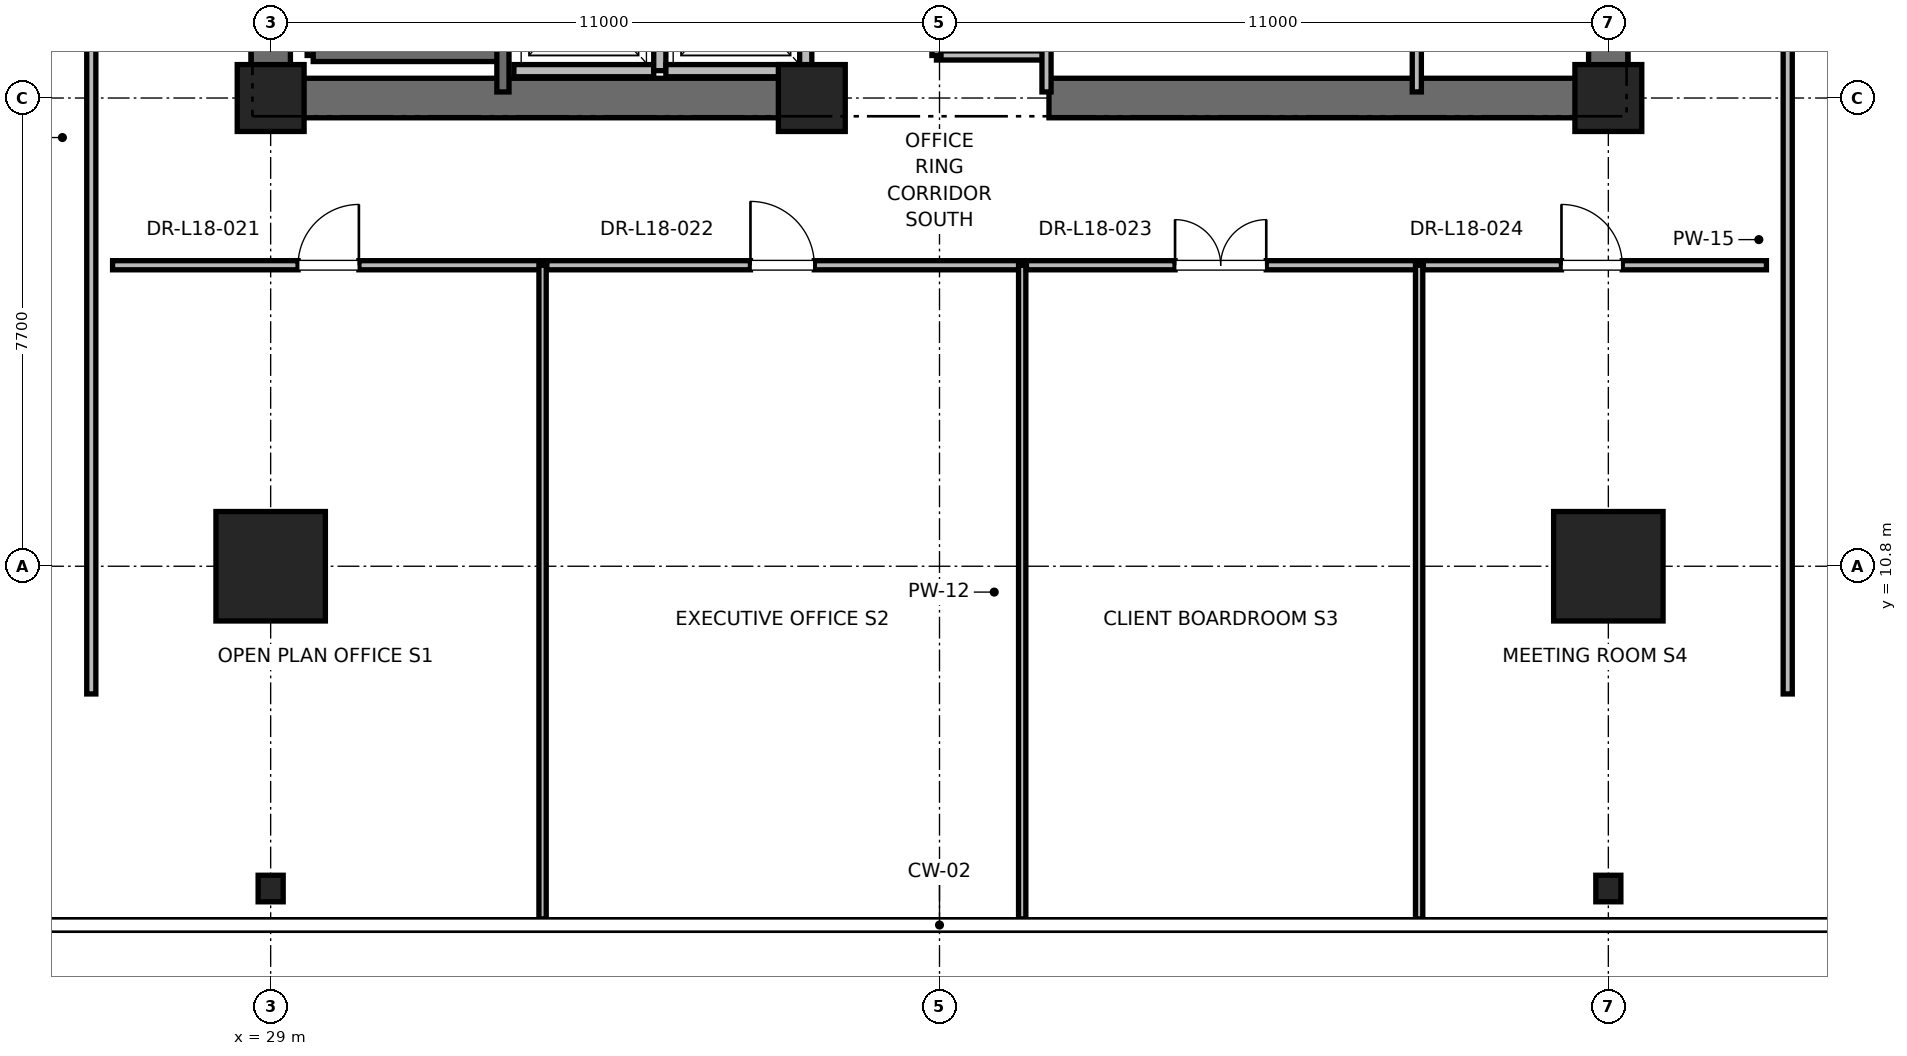
"""IFC4 building model, lengths in metres.
Left out: names, types, materials, properties, quantities, classifications, styles, units other than length and angle.
Written with IfcOpenShell. Run it as: python <this file> out.ifc"""

import sys

from ifc_helpers import new_model, si_unit, direction, frame, frame_2d, origin, origin_2d, place, context, subcontext, project, spatial, rectangle, i_section, extrude, element, fill, save


model = new_model("IFC4")
c1 = context("Model", 3, precision=1e-05, world=origin(), true_north=direction((0.0, 1.0)))
c2 = subcontext(c1, "Body", "Model", "MODEL_VIEW")
j1 = project(units=[si_unit("LENGTHUNIT", "METRE"), si_unit("PLANEANGLEUNIT", "RADIAN")], contexts=[c1])
p1 = place(None, origin())
s1 = spatial("IfcSite", under=j1, at=p1, CompositionType="ELEMENT")
p2 = place(p1, origin())
s2 = spatial("IfcBuilding", under=s1, at=p2, CompositionType="ELEMENT")
p3 = place(p2, frame((0.0, 0.0, 79.6)))
s3 = spatial("IfcBuildingStorey", under=s2, at=p3, CompositionType="ELEMENT", Elevation=79.6)
for number, where, z_axis, x_axis in (
    (1, (29.0, 10.8, 0.0), (0.0, 0.0, 1.0), (1.0, 0.0, 0.0)),
    (2, (51.0, 10.8, 0.0), (0.0, 0.0, 1.0), (1.0, 0.0, 0.0)),
):
    element("IfcColumn", number, at=place(p3, frame(where, z_axis=z_axis, x_axis=x_axis)), inside=s3, PredefinedType="COLUMN", context=c2, shape_type="SweptSolid", body=[
        extrude(rectangle(XDim=1.8, YDim=1.8, at=origin_2d()), origin(), (0.0, 0.0, 1.0), 4.0),
    ])
for number, where, z_axis, x_axis in (
    (3, (29.0, 5.5, 0.0), (0.0, 0.0, 1.0), (1.0, 0.0, 0.0)),
    (4, (51.0, 5.5, 0.0), (0.0, 0.0, 1.0), (1.0, 0.0, 0.0)),
):
    element("IfcColumn", number, at=place(p3, frame(where, z_axis=z_axis, x_axis=x_axis)), inside=s3, PredefinedType="COLUMN", context=c2, shape_type="SweptSolid", body=[
        extrude(i_section(OverallWidth=0.412, OverallDepth=0.437, WebThickness=0.036, FlangeThickness=0.058, FilletRadius=0.015, at=origin_2d()), origin(), (0.0, 0.0, 1.0), 4.0),
    ])
for number, where, z_axis, x_axis in (
    (5, (29.0, 18.5, 0.0), (0.0, 0.0, 1.0), (1.0, 0.0, 0.0)),
    (6, (51.0, 18.5, 0.0), (0.0, 0.0, 1.0), (1.0, 0.0, 0.0)),
    (7, (37.9, 18.5, 0.0), (0.0, 0.0, 1.0), (1.0, 0.0, 0.0)),
):
    element("IfcColumn", number, at=place(p3, frame(where, z_axis=z_axis, x_axis=x_axis)), inside=s3, PredefinedType="PILASTER", context=c2, shape_type="SweptSolid", body=[
        extrude(rectangle(XDim=1.1, YDim=1.1, at=origin_2d()), origin(), (0.0, 0.0, 1.0), 4.0),
    ])
for number, where, z_axis, x_axis in (
    (8, (29.0, 18.5, 0.0), (0.0, 0.0, 1.0), (1.0, 0.0, 0.0)),
    (9, (41.8, 18.5, 0.0), (0.0, 0.0, 1.0), (1.0, 0.0, 0.0)),
):
    element("IfcWall", number, at=place(p3, frame(where, z_axis=z_axis, x_axis=x_axis)), inside=s3, PredefinedType="SHEAR", context=c2, shape_type="SweptSolid", body=[
        extrude(rectangle(XDim=9.2, YDim=0.65, at=frame_2d((4.6, 0.0))), origin(), (0.0, 0.0, 1.0), 3.76),
    ])
p4 = place(p3, frame((29.0, 18.5, 0.0), z_axis=(0.0, 0.0, 1.0), x_axis=(0.0, 1.0, 0.0)))
e10 = element("IfcWall", 10, at=p4, inside=s3, PredefinedType="SHEAR", context=c2, shape_type="SweptSolid", body=[
    extrude(rectangle(XDim=8.8, YDim=0.65, at=frame_2d((4.4, 0.0))), origin(), (0.0, 0.0, 1.0), 3.76),
])
p5 = place(p3, frame((51.0, 18.5, 0.0), z_axis=(0.0, 0.0, 1.0), x_axis=(0.0, 1.0, 0.0)))
e11 = element("IfcWall", 11, at=p5, inside=s3, PredefinedType="SHEAR", context=c2, shape_type="SweptSolid", body=[
    extrude(rectangle(XDim=5.8, YDim=0.65, at=frame_2d((2.9, 0.0))), origin(), (0.0, 0.0, 1.0), 3.76),
])
p6 = place(p3, frame((29.7, 19.2, 0.0), z_axis=(0.0, 0.0, 1.0), x_axis=(0.0, 1.0, 0.0)))
e12 = element("IfcWall", 12, at=p6, inside=s3, PredefinedType="SOLIDWALL", context=c2, shape_type="SweptSolid", body=[
    extrude(rectangle(XDim=8.15, YDim=0.2, at=frame_2d((4.075, 0.0))), origin(), (0.0, 0.0, 1.0), 3.76),
])
p7 = place(p3, frame((29.7, 19.2, 0.0), z_axis=(0.0, 0.0, 1.0), x_axis=(1.0, 0.0, 0.0)))
e13 = element("IfcWall", 13, at=p7, inside=s3, PredefinedType="SOLIDWALL", context=c2, shape_type="SweptSolid", body=[
    extrude(rectangle(XDim=3.12, YDim=0.2, at=frame_2d((1.56, 0.0))), origin(), (0.0, 0.0, 1.0), 3.76),
])
p8 = place(p3, frame((32.82, 18.6, 0.0), z_axis=(0.0, 0.0, 1.0), x_axis=(0.0, 1.0, 0.0)))
e14 = element("IfcWall", 14, at=p8, inside=s3, PredefinedType="SOLIDWALL", context=c2, shape_type="SweptSolid", body=[
    extrude(rectangle(XDim=8.78, YDim=0.2, at=frame_2d((4.39, 0.0))), origin(), (0.0, 0.0, 1.0), 3.76),
])
p9 = place(p3, frame((33.0, 18.95, 0.0), z_axis=(0.0, 0.0, 1.0), x_axis=(1.0, 0.0, 0.0)))
e15 = element("IfcWall", 15, at=p9, inside=s3, PredefinedType="SOLIDWALL", context=c2, shape_type="SweptSolid", body=[
    extrude(rectangle(XDim=2.3, YDim=0.2, at=frame_2d((1.15, 0.0))), origin(), (0.0, 0.0, 1.0), 3.76),
])
p10 = place(p3, frame((35.4, 18.95, 0.0), z_axis=(0.0, 0.0, 1.0), x_axis=(0.0, 1.0, 0.0)))
e16 = element("IfcWall", 16, at=p10, inside=s3, PredefinedType="SOLIDWALL", context=c2, shape_type="SweptSolid", body=[
    extrude(rectangle(XDim=2.6, YDim=0.2, at=frame_2d((1.3, 0.0))), origin(), (0.0, 0.0, 1.0), 3.76),
])
p11 = place(p3, frame((35.5, 18.95, 0.0), z_axis=(0.0, 0.0, 1.0), x_axis=(1.0, 0.0, 0.0)))
e17 = element("IfcWall", 17, at=p11, inside=s3, PredefinedType="SOLIDWALL", context=c2, shape_type="SweptSolid", body=[
    extrude(rectangle(XDim=2.3, YDim=0.2, at=frame_2d((1.15, 0.0))), origin(), (0.0, 0.0, 1.0), 2.54),
])
p12 = place(p3, frame((37.8, 18.95, 0.0), z_axis=(0.0, 0.0, 1.0), x_axis=(0.0, 1.0, 0.0)))
e18 = element("IfcWall", 18, at=p12, inside=s3, PredefinedType="SOLIDWALL", context=c2, shape_type="SweptSolid", body=[
    extrude(rectangle(XDim=2.6, YDim=0.2, at=frame_2d((1.3, 0.0))), origin(), (0.0, 0.0, 1.0), 2.54),
])
p13 = place(p3, frame((39.95, 19.2, 0.0), z_axis=(0.0, 0.0, 1.0), x_axis=(1.0, 0.0, 0.0)))
e19 = element("IfcWall", 19, at=p13, inside=s3, PredefinedType="PARTITIONING", context=c2, shape_type="SweptSolid", body=[
    extrude(rectangle(XDim=1.81, YDim=0.15, at=frame_2d((0.905, 0.0))), origin(), (0.0, 0.0, 1.0), 2.85),
])
p14 = place(p3, frame((41.76, 18.6, 0.0), z_axis=(0.0, 0.0, 1.0), x_axis=(0.0, 1.0, 0.0)))
e20 = element("IfcWall", 20, at=p14, inside=s3, PredefinedType="PARTITIONING", context=c2, shape_type="SweptSolid", body=[
    extrude(rectangle(XDim=3.6, YDim=0.15, at=frame_2d((1.8, 0.0))), origin(), (0.0, 0.0, 1.0), 2.54),
])
p15 = place(p3, frame((39.95, 19.2, 0.0), z_axis=(0.0, 0.0, 1.0), x_axis=(0.0, 1.0, 0.0)))
e21 = element("IfcWall", 21, at=p15, inside=s3, PredefinedType="PARTITIONING", context=c2, shape_type="SweptSolid", body=[
    extrude(rectangle(XDim=3.0, YDim=0.15, at=frame_2d((1.5, 0.0))), origin(), (0.0, 0.0, 1.0), 2.85),
])
p16 = place(p15, frame((1.05, 0.0, 0.0)))
e22 = element("IfcOpeningElement", 22, at=p16, cuts=e21, PredefinedType="OPENING", context=c2, shape_type="SweptSolid", body=[
    extrude(rectangle(XDim=0.9, YDim=2.1, at=frame_2d((0.45, 1.05))), frame((0.0, 0.075, 0.0), z_axis=(0.0, -1.0, 0.0), x_axis=(1.0, 0.0, 0.0)), (0.0, 0.0, 1.0), 0.15),
])
p17 = place(p3, frame((47.85, 18.6, 0.0), z_axis=(0.0, 0.0, 1.0), x_axis=(0.0, 1.0, 0.0)))
e23 = element("IfcWall", 23, at=p17, inside=s3, PredefinedType="PARTITIONING", context=c2, shape_type="SweptSolid", body=[
    extrude(rectangle(XDim=2.54, YDim=0.15, at=frame_2d((1.27, 0.0))), origin(), (0.0, 0.0, 1.0), 2.85),
])
p18 = place(p3, frame((26.4, 15.75, 0.0), z_axis=(0.0, 0.0, 1.0), x_axis=(1.0, 0.0, 0.0)))
e24 = element("IfcWall", 24, at=p18, inside=s3, PredefinedType="PARTITIONING", context=c2, shape_type="SweptSolid", body=[
    extrude(rectangle(XDim=7.072, YDim=0.15, at=frame_2d((3.536, 0.0))), origin(), (0.0, 0.0, 1.0), 2.85),
])
p19 = place(p18, frame((3.051, 0.0, 0.0)))
e25 = element("IfcOpeningElement", 25, at=p19, cuts=e24, PredefinedType="OPENING", context=c2, shape_type="SweptSolid", body=[
    extrude(rectangle(XDim=1.0, YDim=2.15, at=frame_2d((0.5, 1.075))), frame((0.0, 0.075, 0.0), z_axis=(0.0, -1.0, 0.0), x_axis=(1.0, 0.0, 0.0)), (0.0, 0.0, 1.0), 0.15),
])
p20 = place(p3, frame((33.472, 5.0, 0.0), z_axis=(0.0, 0.0, 1.0), x_axis=(0.0, 1.0, 0.0)))
e26 = element("IfcWall", 26, at=p20, inside=s3, PredefinedType="PARTITIONING", context=c2, shape_type="SweptSolid", body=[
    extrude(rectangle(XDim=10.75, YDim=0.12, at=frame_2d((5.375, 0.0))), origin(), (0.0, 0.0, 1.0), 2.39),
])
p21 = place(p3, frame((33.542, 15.75, 0.0), z_axis=(0.0, 0.0, 1.0), x_axis=(1.0, 0.0, 0.0)))
e27 = element("IfcWall", 27, at=p21, inside=s3, PredefinedType="PARTITIONING", context=c2, shape_type="SweptSolid", body=[
    extrude(rectangle(XDim=7.818, YDim=0.15, at=frame_2d((3.909, 0.0))), origin(), (0.0, 0.0, 1.0), 2.85),
])
p22 = place(p21, frame((3.349, 0.0, 0.0)))
e28 = element("IfcOpeningElement", 28, at=p22, cuts=e27, PredefinedType="OPENING", context=c2, shape_type="SweptSolid", body=[
    extrude(rectangle(XDim=1.05, YDim=2.2, at=frame_2d((0.525, 1.1))), frame((0.0, 0.075, 0.0), z_axis=(0.0, -1.0, 0.0), x_axis=(1.0, 0.0, 0.0)), (0.0, 0.0, 1.0), 0.15),
])
p23 = place(p3, frame((41.36, 5.0, 0.0), z_axis=(0.0, 0.0, 1.0), x_axis=(0.0, 1.0, 0.0)))
e29 = element("IfcWall", 29, at=p23, inside=s3, PredefinedType="PARTITIONING", context=c2, shape_type="SweptSolid", body=[
    extrude(rectangle(XDim=10.75, YDim=0.12, at=frame_2d((5.375, 0.0))), origin(), (0.0, 0.0, 1.0), 2.39),
])
p24 = place(p3, frame((41.43, 15.75, 0.0), z_axis=(0.0, 0.0, 1.0), x_axis=(1.0, 0.0, 0.0)))
e30 = element("IfcWall", 30, at=p24, inside=s3, PredefinedType="PARTITIONING", context=c2, shape_type="SweptSolid", body=[
    extrude(rectangle(XDim=6.458, YDim=0.15, at=frame_2d((3.229, 0.0))), origin(), (0.0, 0.0, 1.0), 2.85),
])
p25 = place(p24, frame((2.444, 0.0, 0.0)))
e31 = element("IfcOpeningElement", 31, at=p25, cuts=e30, PredefinedType="OPENING", context=c2, shape_type="SweptSolid", body=[
    extrude(rectangle(XDim=1.5, YDim=2.25, at=frame_2d((0.75, 1.125))), frame((0.0, 0.075, 0.0), z_axis=(0.0, -1.0, 0.0), x_axis=(1.0, 0.0, 0.0)), (0.0, 0.0, 1.0), 0.15),
])
p26 = place(p3, frame((47.888, 5.0, 0.0), z_axis=(0.0, 0.0, 1.0), x_axis=(0.0, 1.0, 0.0)))
e32 = element("IfcWall", 32, at=p26, inside=s3, PredefinedType="PARTITIONING", context=c2, shape_type="SweptSolid", body=[
    extrude(rectangle(XDim=10.75, YDim=0.12, at=frame_2d((5.375, 0.0))), origin(), (0.0, 0.0, 1.0), 2.39),
])
p27 = place(p3, frame((47.958, 15.75, 0.0), z_axis=(0.0, 0.0, 1.0), x_axis=(1.0, 0.0, 0.0)))
e33 = element("IfcWall", 33, at=p27, inside=s3, PredefinedType="PARTITIONING", context=c2, shape_type="SweptSolid", body=[
    extrude(rectangle(XDim=5.642, YDim=0.15, at=frame_2d((2.821, 0.0))), origin(), (0.0, 0.0, 1.0), 2.85),
])
p28 = place(p27, frame((2.271, 0.0, 0.0)))
e34 = element("IfcOpeningElement", 34, at=p28, cuts=e33, PredefinedType="OPENING", context=c2, shape_type="SweptSolid", body=[
    extrude(rectangle(XDim=1.0, YDim=2.15, at=frame_2d((0.5, 1.075))), frame((0.0, 0.075, 0.0), z_axis=(0.0, -1.0, 0.0), x_axis=(1.0, 0.0, 0.0)), (0.0, 0.0, 1.0), 0.15),
])
p29 = place(p3, frame((26.05, 8.7, 0.0), z_axis=(0.0, 0.0, 1.0), x_axis=(0.0, 1.0, 0.0)))
e35 = element("IfcWall", 35, at=p29, inside=s3, PredefinedType="PARTITIONING", context=c2, shape_type="SweptSolid", body=[
    extrude(rectangle(XDim=37.6, YDim=0.15, at=frame_2d((18.8, 0.0))), origin(), (0.0, 0.0, 1.0), 2.85),
])
p30 = place(p29, frame((18.3, 0.0, 0.0)))
e36 = element("IfcOpeningElement", 36, at=p30, cuts=e35, PredefinedType="OPENING", context=c2, shape_type="SweptSolid", body=[
    extrude(rectangle(XDim=1.0, YDim=2.15, at=frame_2d((0.5, 1.075))), frame((0.0, 0.075, 0.0), z_axis=(0.0, -1.0, 0.0), x_axis=(1.0, 0.0, 0.0)), (0.0, 0.0, 1.0), 0.15),
])
p31 = place(p3, frame((53.95, 8.7, 0.0), z_axis=(0.0, 0.0, 1.0), x_axis=(0.0, 1.0, 0.0)))
e37 = element("IfcWall", 37, at=p31, inside=s3, PredefinedType="PARTITIONING", context=c2, shape_type="SweptSolid", body=[
    extrude(rectangle(XDim=21.056, YDim=0.15, at=frame_2d((10.528, 0.0))), origin(), (0.0, 0.0, 1.0), 2.85),
])
p32 = place(p31, frame((14.943, 0.0, 0.0)))
e38 = element("IfcOpeningElement", 38, at=p32, cuts=e37, PredefinedType="OPENING", context=c2, shape_type="SweptSolid", body=[
    extrude(rectangle(XDim=1.0, YDim=2.15, at=frame_2d((0.5, 1.075))), frame((0.0, 0.075, 0.0), z_axis=(0.0, -1.0, 0.0), x_axis=(1.0, 0.0, 0.0)), (0.0, 0.0, 1.0), 0.15),
])
p33 = place(p19, origin())
e39 = element("IfcDoor", 39, at=p33, inside=s3, OperationType="SINGLE_SWING_RIGHT", PredefinedType="DOOR", context=c2, shape_type="SweptSolid", body=[
    extrude(rectangle(XDim=1.0, YDim=2.15, at=frame_2d((0.5, 1.075))), frame((0.0, 0.025, 0.0), z_axis=(0.0, -1.0, 0.0), x_axis=(1.0, 0.0, 0.0)), (0.0, 0.0, 1.0), 0.05),
])
fill(e25, e39)
p34 = place(p22, origin())
e40 = element("IfcDoor", 40, at=p34, inside=s3, OperationType="SINGLE_SWING_LEFT", PredefinedType="DOOR", context=c2, shape_type="SweptSolid", body=[
    extrude(rectangle(XDim=1.05, YDim=2.2, at=frame_2d((0.525, 1.1))), frame((0.0, 0.025, 0.0), z_axis=(0.0, -1.0, 0.0), x_axis=(1.0, 0.0, 0.0)), (0.0, 0.0, 1.0), 0.05),
])
fill(e28, e40)
p35 = place(p25, origin())
e41 = element("IfcDoor", 41, at=p35, inside=s3, OperationType="DOUBLE_DOOR_SINGLE_SWING", PredefinedType="DOOR", context=c2, shape_type="SweptSolid", body=[
    extrude(rectangle(XDim=1.5, YDim=2.25, at=frame_2d((0.75, 1.125))), frame((0.0, 0.025, 0.0), z_axis=(0.0, -1.0, 0.0), x_axis=(1.0, 0.0, 0.0)), (0.0, 0.0, 1.0), 0.05),
])
fill(e31, e41)
p36 = place(p28, origin())
e42 = element("IfcDoor", 42, at=p36, inside=s3, OperationType="SINGLE_SWING_LEFT", PredefinedType="DOOR", context=c2, shape_type="SweptSolid", body=[
    extrude(rectangle(XDim=1.0, YDim=2.15, at=frame_2d((0.5, 1.075))), frame((0.0, 0.025, 0.0), z_axis=(0.0, -1.0, 0.0), x_axis=(1.0, 0.0, 0.0)), (0.0, 0.0, 1.0), 0.05),
])
fill(e34, e42)
save(model, sys.argv[1])
